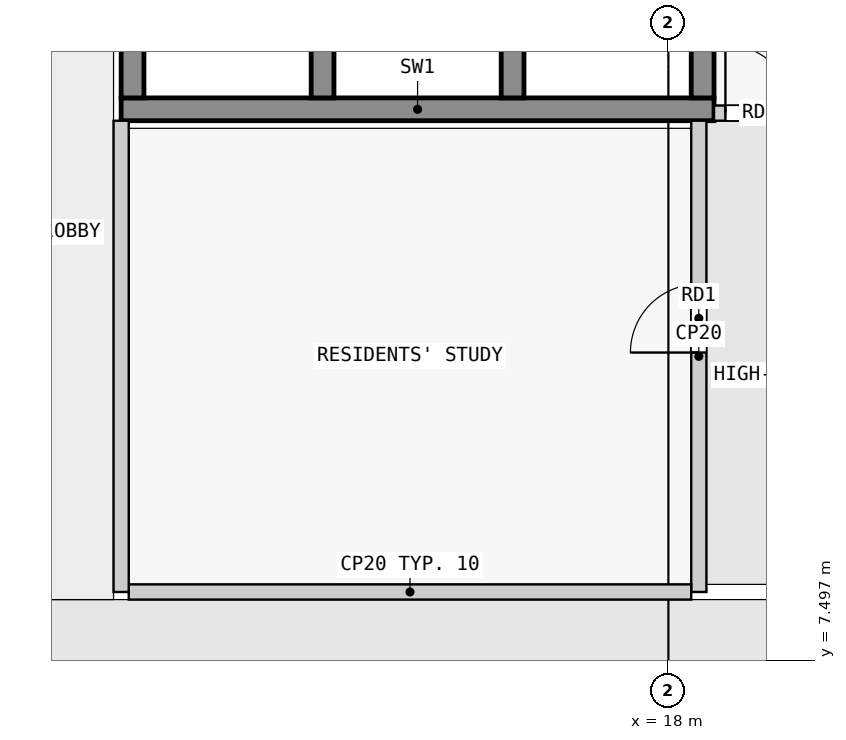
"""IFC4 building model, lengths in metres.
Left out: names, types, materials, properties, quantities, classifications, styles, units other than length and angle.
Written with IfcOpenShell. Run it as: python <this file> out.ifc"""

import sys

from ifc_helpers import new_model, si_unit, direction, frame, frame_2d, origin, place, context, subcontext, project, spatial, rectangle, extrude, element, fill, save


model = new_model("IFC4")
c1 = context("Model", 3, precision=1e-05, world=origin(), true_north=direction((0.0, 1.0)))
c2 = subcontext(c1, "Body", "Model", "MODEL_VIEW")
j1 = project(units=[si_unit("LENGTHUNIT", "METRE"), si_unit("PLANEANGLEUNIT", "RADIAN")], contexts=[c1])
p1 = place(None, origin())
s1 = spatial("IfcSite", under=j1, at=p1, CompositionType="ELEMENT")
p2 = place(p1, origin())
s2 = spatial("IfcBuilding", under=s1, at=p2, CompositionType="ELEMENT")
p3 = place(p2, frame((0.0, 0.0, 37.3)))
s3 = spatial("IfcBuildingStorey", under=s2, at=p3, CompositionType="ELEMENT", Elevation=37.3)
p4 = place(p3, frame((10.8, 14.75, 0.0), z_axis=(0.0, 0.0, 1.0), x_axis=(1.0, 0.0, 0.0)))
e1 = element("IfcWall", 1, at=p4, inside=s3, PredefinedType="SHEAR", context=c2, shape_type="SweptSolid", body=[
    extrude(rectangle(XDim=7.8, YDim=0.3, at=frame_2d((3.9, 0.0))), origin(), (0.0, 0.0, 1.0), 3.25),
])
for number, where, z_axis, x_axis in (
    (2, (10.95, 14.9, 0.0), (0.0, 0.0, 1.0), (0.0, 1.0, 0.0)),
    (3, (13.45, 14.9, 0.0), (0.0, 0.0, 1.0), (0.0, 1.0, 0.0)),
    (4, (15.95, 14.9, 0.0), (0.0, 0.0, 1.0), (0.0, 1.0, 0.0)),
    (5, (18.45, 14.9, 0.0), (0.0, 0.0, 1.0), (0.0, 1.0, 0.0)),
):
    element("IfcWall", number, at=place(p3, frame(where, z_axis=z_axis, x_axis=x_axis)), inside=s3, PredefinedType="SHEAR", context=c2, shape_type="SweptSolid", body=[
        extrude(rectangle(XDim=2.0, YDim=0.3, at=frame_2d((1.0, 0.0))), origin(), (0.0, 0.0, 1.0), 3.25),
    ])
p5 = place(p3, frame((10.8, 8.4, 0.0), z_axis=(0.0, 0.0, 1.0), x_axis=(0.0, 1.0, 0.0)))
e6 = element("IfcWall", 6, at=p5, inside=s3, PredefinedType="PARTITIONING", context=c2, shape_type="SweptSolid", body=[
    extrude(rectangle(XDim=6.2, YDim=0.2, at=frame_2d((3.1, 0.0))), origin(), (0.0, 0.0, 1.0), 3.25),
])
p6 = place(p3, frame((10.9, 8.4, 0.0), z_axis=(0.0, 0.0, 1.0), x_axis=(1.0, 0.0, 0.0)))
e7 = element("IfcWall", 7, at=p6, inside=s3, PredefinedType="PARTITIONING", context=c2, shape_type="SweptSolid", body=[
    extrude(rectangle(XDim=7.4, YDim=0.2, at=frame_2d((3.7, 0.0))), origin(), (0.0, 0.0, 1.0), 3.25),
])
p7 = place(p3, frame((18.4, 8.4, 0.0), z_axis=(0.0, 0.0, 1.0), x_axis=(0.0, 1.0, 0.0)))
e8 = element("IfcWall", 8, at=p7, inside=s3, PredefinedType="PARTITIONING", context=c2, shape_type="SweptSolid", body=[
    extrude(rectangle(XDim=6.2, YDim=0.2, at=frame_2d((3.1, 0.0))), origin(), (0.0, 0.0, 1.0), 3.25),
])
p8 = place(p7, frame((3.15, 0.0, 0.0)))
e9 = element("IfcOpeningElement", 9, at=p8, cuts=e8, PredefinedType="OPENING", context=c2, shape_type="SweptSolid", body=[
    extrude(rectangle(XDim=0.9, YDim=2.1, at=frame_2d((0.45, 1.05))), frame((0.0, 0.11, 0.0), z_axis=(0.0, -1.0, 0.0), x_axis=(1.0, 0.0, 0.0)), (0.0, 0.0, 1.0), 0.22),
])
p9 = place(p3, frame((18.6, 14.7, 0.0), z_axis=(0.0, 0.0, 1.0), x_axis=(1.0, 0.0, 0.0)))
e10 = element("IfcWall", 10, at=p9, inside=s3, PredefinedType="PARTITIONING", context=c2, shape_type="SweptSolid", body=[
    extrude(rectangle(XDim=3.15, YDim=0.2, at=frame_2d((1.575, 0.0))), origin(), (0.0, 0.0, 1.0), 3.25),
])
p10 = place(p9, frame((0.15, 0.0, 0.0)))
e11 = element("IfcOpeningElement", 11, at=p10, cuts=e10, PredefinedType="OPENING", context=c2, shape_type="SweptSolid", body=[
    extrude(rectangle(XDim=0.9, YDim=2.1, at=frame_2d((0.45, 1.05))), frame((0.0, 0.11, 0.0), z_axis=(0.0, -1.0, 0.0), x_axis=(1.0, 0.0, 0.0)), (0.0, 0.0, 1.0), 0.22),
])
p11 = place(p9, frame((1.725, 0.0, 0.0)))
e12 = element("IfcOpeningElement", 12, at=p11, cuts=e10, PredefinedType="OPENING", context=c2, shape_type="SweptSolid", body=[
    extrude(rectangle(XDim=0.9, YDim=2.1, at=frame_2d((0.45, 1.05))), frame((0.0, 0.11, 0.0), z_axis=(0.0, -1.0, 0.0), x_axis=(1.0, 0.0, 0.0)), (0.0, 0.0, 1.0), 0.22),
])
p12 = place(p8, origin())
e13 = element("IfcDoor", 13, at=p12, inside=s3, OperationType="SINGLE_SWING_LEFT", PredefinedType="DOOR", context=c2, shape_type="SweptSolid", body=[
    extrude(rectangle(XDim=0.9, YDim=2.1, at=frame_2d((0.45, 1.05))), frame((0.0, 0.025, 0.0), z_axis=(0.0, -1.0, 0.0), x_axis=(1.0, 0.0, 0.0)), (0.0, 0.0, 1.0), 0.05),
])
fill(e9, e13)
p13 = place(p10, origin())
e14 = element("IfcDoor", 14, at=p13, inside=s3, OperationType="SINGLE_SWING_LEFT", PredefinedType="DOOR", context=c2, shape_type="SweptSolid", body=[
    extrude(rectangle(XDim=0.9, YDim=2.1, at=frame_2d((0.45, 1.05))), frame((0.0, 0.025, 0.0), z_axis=(0.0, -1.0, 0.0), x_axis=(1.0, 0.0, 0.0)), (0.0, 0.0, 1.0), 0.05),
])
fill(e11, e14)
save(model, sys.argv[1])
